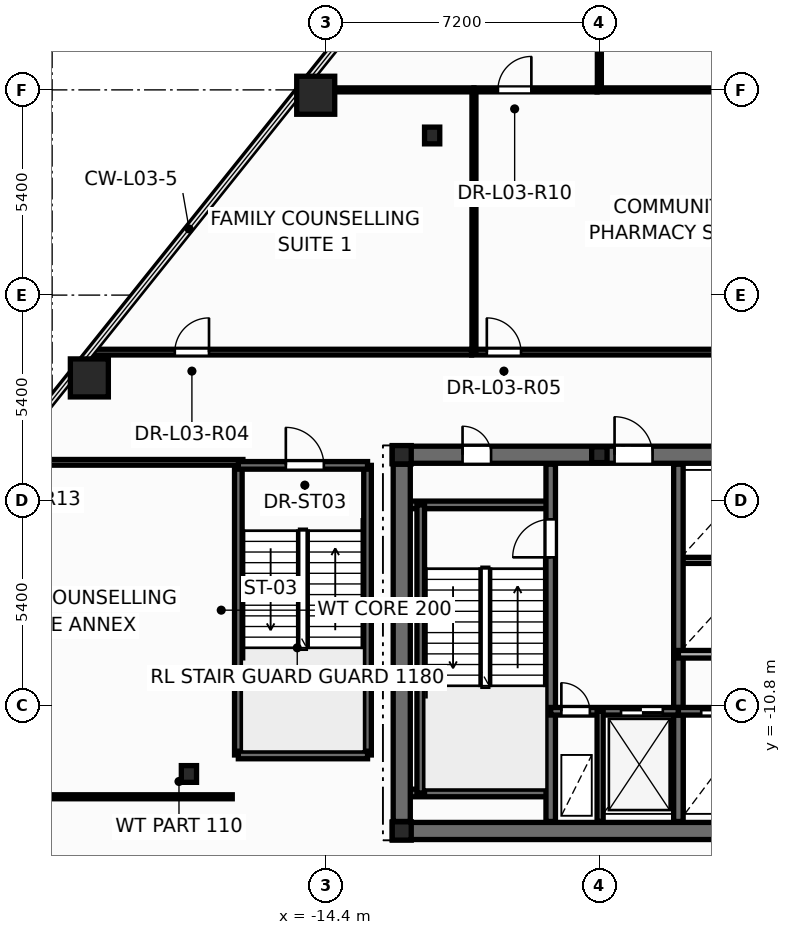
"""IFC4 building model, lengths in metres.
Left out: names, types, materials, properties, quantities, classifications, styles, units other than length and angle.
Written with IfcOpenShell. Run it as: python <this file> out.ifc"""

import sys

from ifc_helpers import new_model, si_unit, direction, frame, frame_2d, origin, origin_2d, place, context, subcontext, project, spatial, rectangle, hollow_circle, i_section, extrude, element, fill, save


model = new_model("IFC4")
c1 = context("Model", 3, precision=1e-05, world=origin(), true_north=direction((0.0, 1.0)))
c2 = subcontext(c1, "Body", "Model", "MODEL_VIEW")
j1 = project(units=[si_unit("LENGTHUNIT", "METRE"), si_unit("PLANEANGLEUNIT", "RADIAN")], contexts=[c1])
p1 = place(None, origin())
s1 = spatial("IfcSite", under=j1, at=p1, CompositionType="ELEMENT")
p2 = place(p1, origin())
s2 = spatial("IfcBuilding", under=s1, at=p2, CompositionType="ELEMENT")
p3 = place(p2, frame((0.0, 0.0, 14.4)))
s3 = spatial("IfcBuildingStorey", under=s2, at=p3, CompositionType="ELEMENT", Elevation=14.4)
for number, where, z_axis, x_axis in (
    (1, (-14.664, 5.259, 0.0), (0.0, 0.0, 1.0), (1.0, 0.0, 0.0)),
    (2, (-20.62, -2.179, 0.0), (0.0, 0.0, 1.0), (1.0, 0.0, 0.0)),
):
    element("IfcColumn", number, at=place(p3, frame(where, z_axis=z_axis, x_axis=x_axis)), inside=s3, PredefinedType="COLUMN", context=c2, shape_type="SweptSolid", body=[
        extrude(hollow_circle(Radius=0.5, WallThickness=0.045, at=origin_2d()), origin(), (0.0, 0.0, 1.0), 4.5),
    ])
for number, where, z_axis, x_axis in (
    (3, (-12.4, -14.1, 0.0), (0.0, 0.0, 1.0), (1.0, 0.0, 0.0)),
    (4, (-12.4, -4.2, 0.0), (0.0, 0.0, 1.0), (1.0, 0.0, 0.0)),
):
    element("IfcColumn", number, at=place(p3, frame(where, z_axis=z_axis, x_axis=x_axis)), inside=s3, PredefinedType="COLUMN", context=c2, shape_type="SweptSolid", body=[
        extrude(i_section(OverallWidth=0.5, OverallDepth=0.482, WebThickness=0.04, FlangeThickness=0.045, at=origin_2d()), origin(), (0.0, 0.0, 1.0), 4.5),
    ])
p4 = place(p3, frame((-7.2, -4.2, 0.0), z_axis=(0.0, 0.0, 1.0), x_axis=(1.0, 0.0, 0.0)))
e5 = element("IfcColumn", 5, at=p4, inside=s3, PredefinedType="PILASTER", context=c2, shape_type="SweptSolid", body=[
    extrude(i_section(OverallWidth=0.405, OverallDepth=0.414, WebThickness=0.022, FlangeThickness=0.032, at=origin_2d()), origin(), (0.0, 0.0, 1.0), 4.5),
])
for number, where, z_axis, x_axis in (
    (6, (-18.0, -12.6, 0.0), (0.0, 0.0, 1.0), (1.0, 0.0, 0.0)),
    (7, (-11.6, 4.2, 0.0), (0.0, 0.0, 1.0), (1.0, 0.0, 0.0)),
):
    element("IfcColumn", number, at=place(p3, frame(where, z_axis=z_axis, x_axis=x_axis)), inside=s3, PredefinedType="COLUMN", context=c2, shape_type="SweptSolid", body=[
        extrude(i_section(OverallWidth=0.4, OverallDepth=0.44, WebThickness=0.028, FlangeThickness=0.04, at=origin_2d()), origin(), (0.0, 0.0, 1.0), 4.5),
    ])
p5 = place(p3, frame((-5.12, -6.98, 0.0), z_axis=(0.0, 0.0, 1.0), x_axis=(1.0, 0.0, 0.0)))
e8 = element("IfcWall", 8, at=p5, inside=s3, PredefinedType="PARTITIONING", context=c2, shape_type="SweptSolid", body=[
    extrude(rectangle(XDim=2.24, YDim=0.16, at=frame_2d((1.12, 0.0))), origin(), (0.0, 0.0, 1.0), 4.1),
])
p6 = place(p3, frame((-12.65, -14.1, 0.0), z_axis=(0.0, 0.0, 1.0), x_axis=(1.0, 0.0, 0.0)))
e9 = element("IfcWall", 9, at=p6, inside=s3, PredefinedType="SHEAR", context=c2, shape_type="SweptSolid", body=[
    extrude(rectangle(XDim=25.3, YDim=0.45, at=frame_2d((12.65, 0.0))), origin(), (0.0, 0.0, 1.0), 4.5),
])
p7 = place(p3, frame((-12.65, -4.2, 0.0), z_axis=(0.0, 0.0, 1.0), x_axis=(1.0, 0.0, 0.0)))
e10 = element("IfcWall", 10, at=p7, inside=s3, PredefinedType="SHEAR", context=c2, shape_type="SweptSolid", body=[
    extrude(rectangle(XDim=25.3, YDim=0.45, at=frame_2d((12.65, 0.0))), origin(), (0.0, 0.0, 1.0), 4.5),
])
p8 = place(p7, frame((1.85, 0.0, 0.0)))
e11 = element("IfcOpeningElement", 11, at=p8, cuts=e10, PredefinedType="OPENING", context=c2, shape_type="SweptSolid", body=[
    extrude(rectangle(XDim=0.756, YDim=2.054, at=frame_2d((0.375, 1.027))), frame((0.0, 0.235, 0.0), z_axis=(0.0, -1.0, 0.0), x_axis=(1.0, 0.0, 0.0)), (0.0, 0.0, 1.0), 0.47),
])
p9 = place(p7, frame((22.65, 0.0, 0.0)))
e12 = element("IfcOpeningElement", 12, at=p9, cuts=e10, PredefinedType="OPENING", context=c2, shape_type="SweptSolid", body=[
    extrude(rectangle(XDim=0.756, YDim=2.054, at=frame_2d((0.375, 1.027))), frame((0.0, 0.235, 0.0), z_axis=(0.0, -1.0, 0.0), x_axis=(1.0, 0.0, 0.0)), (0.0, 0.0, 1.0), 0.47),
])
p10 = place(p7, frame((5.85, 0.0, 0.0)))
e13 = element("IfcOpeningElement", 13, at=p10, cuts=e10, PredefinedType="OPENING", context=c2, shape_type="SweptSolid", body=[
    extrude(rectangle(XDim=1.006, YDim=2.104, at=frame_2d((0.5, 1.052))), frame((0.0, 0.235, 0.0), z_axis=(0.0, -1.0, 0.0), x_axis=(1.0, 0.0, 0.0)), (0.0, 0.0, 1.0), 0.47),
])
p11 = place(p7, frame((10.35, 0.0, 0.0)))
e14 = element("IfcOpeningElement", 14, at=p11, cuts=e10, PredefinedType="OPENING", context=c2, shape_type="SweptSolid", body=[
    extrude(rectangle(XDim=1.406, YDim=2.154, at=frame_2d((0.7, 1.077))), frame((0.0, 0.235, 0.0), z_axis=(0.0, -1.0, 0.0), x_axis=(1.0, 0.0, 0.0)), (0.0, 0.0, 1.0), 0.47),
])
p12 = place(p7, frame((18.45, 0.0, 0.0)))
e15 = element("IfcOpeningElement", 15, at=p12, cuts=e10, PredefinedType="OPENING", context=c2, shape_type="SweptSolid", body=[
    extrude(rectangle(XDim=1.006, YDim=2.104, at=frame_2d((0.5, 1.052))), frame((0.0, 0.235, 0.0), z_axis=(0.0, -1.0, 0.0), x_axis=(1.0, 0.0, 0.0)), (0.0, 0.0, 1.0), 0.47),
])
for number, where, z_axis, x_axis in (
    (16, (-12.35, -5.52, 0.0), (0.0, 0.0, 1.0), (1.0, 0.0, 0.0)),
    (17, (-12.35, -13.1, 0.0), (0.0, 0.0, 1.0), (1.0, 0.0, 0.0)),
):
    element("IfcWall", number, at=place(p3, frame(where, z_axis=z_axis, x_axis=x_axis)), inside=s3, PredefinedType="SOLIDWALL", context=c2, shape_type="SweptSolid", body=[
        extrude(rectangle(XDim=3.87, YDim=0.2, at=frame_2d((1.935, 0.0))), origin(), (0.0, 0.0, 1.0), 4.5),
    ])
p13 = place(p3, frame((-11.9, -13.1, 0.0), z_axis=(0.0, 0.0, 1.0), x_axis=(0.0, 1.0, 0.0)))
e18 = element("IfcWall", 18, at=p13, inside=s3, PredefinedType="SOLIDWALL", context=c2, shape_type="SweptSolid", body=[
    extrude(rectangle(XDim=7.58, YDim=0.2, at=frame_2d((3.79, 0.0))), origin(), (0.0, 0.0, 1.0), 4.5),
])
p14 = place(p3, frame((-8.48, -13.85, 0.0), z_axis=(0.0, 0.0, 1.0), x_axis=(0.0, 1.0, 0.0)))
e19 = element("IfcWall", 19, at=p14, inside=s3, PredefinedType="SHEAR", context=c2, shape_type="SweptSolid", body=[
    extrude(rectangle(XDim=9.4, YDim=0.25, at=frame_2d((4.7, 0.0))), origin(), (0.0, 0.0, 1.0), 4.5),
])
p15 = place(p14, frame((6.95, 0.0, 0.0)))
e20 = element("IfcOpeningElement", 20, at=p15, cuts=e19, PredefinedType="OPENING", context=c2, shape_type="SweptSolid", body=[
    extrude(rectangle(XDim=1.006, YDim=2.104, at=frame_2d((0.5, 1.052))), frame((0.0, 0.135, 0.0), z_axis=(0.0, -1.0, 0.0), x_axis=(1.0, 0.0, 0.0)), (0.0, 0.0, 1.0), 0.27),
])
p16 = place(p3, frame((-5.12, -13.85, 0.0), z_axis=(0.0, 0.0, 1.0), x_axis=(0.0, 1.0, 0.0)))
e21 = element("IfcWall", 21, at=p16, inside=s3, PredefinedType="SHEAR", context=c2, shape_type="SweptSolid", body=[
    extrude(rectangle(XDim=9.4, YDim=0.25, at=frame_2d((4.7, 0.0))), origin(), (0.0, 0.0, 1.0), 4.5),
])
p17 = place(p3, frame((-8.48, -10.95, 0.0), z_axis=(0.0, 0.0, 1.0), x_axis=(1.0, 0.0, 0.0)))
e22 = element("IfcWall", 22, at=p17, inside=s3, PredefinedType="SOLIDWALL", context=c2, shape_type="SweptSolid", body=[
    extrude(rectangle(XDim=3.36, YDim=0.2, at=frame_2d((1.68, 0.0))), origin(), (0.0, 0.0, 1.0), 4.5),
])
p18 = place(p17, frame((0.28, 0.0, 0.0)))
e23 = element("IfcOpeningElement", 23, at=p18, cuts=e22, PredefinedType="OPENING", context=c2, shape_type="SweptSolid", body=[
    extrude(rectangle(XDim=0.756, YDim=2.054, at=frame_2d((0.375, 1.027))), frame((0.0, 0.11, 0.0), z_axis=(0.0, -1.0, 0.0), x_axis=(1.0, 0.0, 0.0)), (0.0, 0.0, 1.0), 0.22),
])
p19 = place(p17, frame((1.85, 0.0, 0.0)))
e24 = element("IfcOpeningElement", 24, at=p19, cuts=e22, PredefinedType="OPENING", context=c2, shape_type="SweptSolid", body=[
    extrude(rectangle(XDim=1.106, YDim=2.104, at=frame_2d((0.55, 1.052))), frame((0.0, 0.11, 0.0), z_axis=(0.0, -1.0, 0.0), x_axis=(1.0, 0.0, 0.0)), (0.0, 0.0, 1.0), 0.22),
])
p20 = place(p3, frame((-5.12, -10.95, 0.0), z_axis=(0.0, 0.0, 1.0), x_axis=(1.0, 0.0, 0.0)))
e25 = element("IfcWall", 25, at=p20, inside=s3, PredefinedType="SOLIDWALL", context=c2, shape_type="SweptSolid", body=[
    extrude(rectangle(XDim=10.24, YDim=0.2, at=frame_2d((5.12, 0.0))), origin(), (0.0, 0.0, 1.0), 4.5),
])
p21 = place(p20, frame((0.6, 0.0, 0.0)))
e26 = element("IfcOpeningElement", 26, at=p21, cuts=e25, PredefinedType="OPENING", context=c2, shape_type="SweptSolid", body=[
    extrude(rectangle(XDim=1.106, YDim=2.104, at=frame_2d((0.55, 1.052))), frame((0.0, 0.11, 0.0), z_axis=(0.0, -1.0, 0.0), x_axis=(1.0, 0.0, 0.0)), (0.0, 0.0, 1.0), 0.22),
])
p22 = place(p20, frame((2.67, 0.0, 0.0)))
e27 = element("IfcOpeningElement", 27, at=p22, cuts=e25, PredefinedType="OPENING", context=c2, shape_type="SweptSolid", body=[
    extrude(rectangle(XDim=1.106, YDim=2.104, at=frame_2d((0.55, 1.052))), frame((0.0, 0.11, 0.0), z_axis=(0.0, -1.0, 0.0), x_axis=(1.0, 0.0, 0.0)), (0.0, 0.0, 1.0), 0.22),
])
p23 = place(p20, frame((4.57, 0.0, 0.0)))
e28 = element("IfcOpeningElement", 28, at=p23, cuts=e25, PredefinedType="OPENING", context=c2, shape_type="SweptSolid", body=[
    extrude(rectangle(XDim=1.106, YDim=2.104, at=frame_2d((0.55, 1.052))), frame((0.0, 0.11, 0.0), z_axis=(0.0, -1.0, 0.0), x_axis=(1.0, 0.0, 0.0)), (0.0, 0.0, 1.0), 0.22),
])
p24 = place(p20, frame((6.47, 0.0, 0.0)))
e29 = element("IfcOpeningElement", 29, at=p24, cuts=e25, PredefinedType="OPENING", context=c2, shape_type="SweptSolid", body=[
    extrude(rectangle(XDim=1.106, YDim=2.104, at=frame_2d((0.55, 1.052))), frame((0.0, 0.11, 0.0), z_axis=(0.0, -1.0, 0.0), x_axis=(1.0, 0.0, 0.0)), (0.0, 0.0, 1.0), 0.22),
])
p25 = place(p20, frame((8.54, 0.0, 0.0)))
e30 = element("IfcOpeningElement", 30, at=p25, cuts=e25, PredefinedType="OPENING", context=c2, shape_type="SweptSolid", body=[
    extrude(rectangle(XDim=1.106, YDim=2.104, at=frame_2d((0.55, 1.052))), frame((0.0, 0.11, 0.0), z_axis=(0.0, -1.0, 0.0), x_axis=(1.0, 0.0, 0.0)), (0.0, 0.0, 1.0), 0.22),
])
p26 = place(p3, frame((-7.18, -13.85, 0.0), z_axis=(0.0, 0.0, 1.0), x_axis=(0.0, 1.0, 0.0)))
e31 = element("IfcWall", 31, at=p26, inside=s3, PredefinedType="PARTITIONING", context=c2, shape_type="SweptSolid", body=[
    extrude(rectangle(XDim=2.9, YDim=0.16, at=frame_2d((1.45, 0.0))), origin(), (0.0, 0.0, 1.0), 3.125),
])
p27 = place(p3, frame((-12.4, -13.85, 0.0), z_axis=(0.0, 0.0, 1.0), x_axis=(0.0, 1.0, 0.0)))
e32 = element("IfcWall", 32, at=p27, inside=s3, PredefinedType="SHEAR", context=c2, shape_type="SweptSolid", body=[
    extrude(rectangle(XDim=9.4, YDim=0.45, at=frame_2d((4.7, 0.0))), origin(), (0.0, 0.0, 1.0), 4.5),
])
p28 = place(p3, frame((-5.12, -9.45, 0.0), z_axis=(0.0, 0.0, 1.0), x_axis=(1.0, 0.0, 0.0)))
e33 = element("IfcWall", 33, at=p28, inside=s3, PredefinedType="SOLIDWALL", context=c2, shape_type="SweptSolid", body=[
    extrude(rectangle(XDim=2.24, YDim=0.2, at=frame_2d((1.12, 0.0))), origin(), (0.0, 0.0, 1.0), 4.1),
])
p29 = place(p3, frame((-10.56, -1.5, 0.0), z_axis=(0.0, 0.0, 1.0), x_axis=(1.0, 0.0, 0.0)))
e34 = element("IfcWall", 34, at=p29, inside=s3, PredefinedType="PARTITIONING", context=c2, shape_type="SweptSolid", body=[
    extrude(rectangle(XDim=10.62, YDim=0.15, at=frame_2d((5.31, 0.0))), origin(), (0.0, 0.0, 1.0), 4.1),
])
p30 = place(p29, frame((0.399, 0.0, 0.0)))
e35 = element("IfcOpeningElement", 35, at=p30, cuts=e34, PredefinedType="OPENING", context=c2, shape_type="SweptSolid", body=[
    extrude(rectangle(XDim=0.906, YDim=2.104, at=frame_2d((0.45, 1.052))), frame((0.0, 0.085, 0.0), z_axis=(0.0, -1.0, 0.0), x_axis=(1.0, 0.0, 0.0)), (0.0, 0.0, 1.0), 0.17),
])
p31 = place(p3, frame((-20.589, -1.5, 0.0), z_axis=(0.0, 0.0, 1.0), x_axis=(1.0, 0.0, 0.0)))
e36 = element("IfcWall", 36, at=p31, inside=s3, PredefinedType="PARTITIONING", context=c2, shape_type="SweptSolid", body=[
    extrude(rectangle(XDim=10.027, YDim=0.15, at=frame_2d((5.014, 0.0))), origin(), (0.0, 0.0, 1.0), 3.167),
])
p32 = place(p31, frame((2.218, 0.0, 0.0)))
e37 = element("IfcOpeningElement", 37, at=p32, cuts=e36, PredefinedType="OPENING", context=c2, shape_type="SweptSolid", body=[
    extrude(rectangle(XDim=0.906, YDim=2.104, at=frame_2d((0.45, 1.052))), frame((0.0, 0.085, 0.0), z_axis=(0.0, -1.0, 0.0), x_axis=(1.0, 0.0, 0.0)), (0.0, 0.0, 1.0), 0.17),
])
p33 = place(p3, frame((-26.205, -13.2, 0.0), z_axis=(0.0, 0.0, 1.0), x_axis=(1.0, 0.0, 0.0)))
e38 = element("IfcWall", 38, at=p33, inside=s3, PredefinedType="PARTITIONING", context=c2, shape_type="SweptSolid", body=[
    extrude(rectangle(XDim=9.345, YDim=0.105, at=frame_2d((4.672, 0.0))), origin(), (0.0, 0.0, 1.0), 3.463),
])
p34 = place(p33, frame((0.1, 0.0, 0.0)))
e39 = element("IfcOpeningElement", 39, at=p34, cuts=e38, PredefinedType="OPENING", context=c2, shape_type="SweptSolid", body=[
    extrude(rectangle(XDim=0.886, YDim=2.104, at=frame_2d((0.44, 1.052))), frame((0.0, 0.062, 0.0), z_axis=(0.0, -1.0, 0.0), x_axis=(1.0, 0.0, 0.0)), (0.0, 0.0, 1.0), 0.125),
])
p35 = place(p3, frame((-7.2, 5.4, 0.0), z_axis=(0.0, 0.0, 1.0), x_axis=(0.0, 1.0, 0.0)))
e40 = element("IfcWall", 40, at=p35, inside=s3, PredefinedType="PARTITIONING", context=c2, shape_type="SweptSolid", body=[
    extrude(rectangle(XDim=8.936, YDim=0.105, at=frame_2d((4.468, 0.0))), origin(), (0.0, 0.0, 1.0), 3.075),
])
for number, where, z_axis, x_axis in (
    (41, (-16.7, -12.1, 0.0), (0.0, 0.0, 1.0), (0.0, 1.0, 0.0)),
    (42, (-13.3, -12.1, 0.0), (0.0, 0.0, 1.0), (0.0, 1.0, 0.0)),
):
    element("IfcWall", number, at=place(p3, frame(where, z_axis=z_axis, x_axis=x_axis)), inside=s3, PredefinedType="SOLIDWALL", context=c2, shape_type="SweptSolid", body=[
        extrude(rectangle(XDim=7.62, YDim=0.2, at=frame_2d((3.81, 0.0))), origin(), (0.0, 0.0, 1.0), 4.5),
    ])
p36 = place(p3, frame((-7.26, 5.4, 0.0), z_axis=(0.0, 0.0, 1.0), x_axis=(1.0, 0.0, 0.0)))
e43 = element("IfcWall", 43, at=p36, inside=s3, PredefinedType="PARTITIONING", context=c2, shape_type="SweptSolid", body=[
    extrude(rectangle(XDim=7.26, YDim=0.105, at=frame_2d((3.63, 0.0))), origin(), (0.0, 0.0, 1.0), 4.1),
])
p37 = place(p3, frame((-10.5, -1.5, 0.0), z_axis=(0.0, 0.0, 1.0), x_axis=(0.0, 1.0, 0.0)))
e44 = element("IfcWall", 44, at=p37, inside=s3, PredefinedType="PARTITIONING", context=c2, shape_type="SweptSolid", body=[
    extrude(rectangle(XDim=6.9, YDim=0.105, at=frame_2d((3.45, 0.0))), origin(), (0.0, 0.0, 1.0), 2.875),
])
p38 = place(p3, frame((-22.912, -4.4, 0.0), z_axis=(0.0, 0.0, 1.0), x_axis=(1.0, 0.0, 0.0)))
e45 = element("IfcWall", 45, at=p38, inside=s3, PredefinedType="PARTITIONING", context=c2, shape_type="SweptSolid", body=[
    extrude(rectangle(XDim=6.332, YDim=0.15, at=frame_2d((3.166, 0.0))), origin(), (0.0, 0.0, 1.0), 3.463),
])
p39 = place(p38, frame((0.1, 0.0, 0.0)))
e46 = element("IfcOpeningElement", 46, at=p39, cuts=e45, PredefinedType="OPENING", context=c2, shape_type="SweptSolid", body=[
    extrude(rectangle(XDim=0.906, YDim=2.104, at=frame_2d((0.45, 1.052))), frame((0.0, 0.085, 0.0), z_axis=(0.0, -1.0, 0.0), x_axis=(1.0, 0.0, 0.0)), (0.0, 0.0, 1.0), 0.17),
])
p40 = place(p3, frame((-15.063, 5.4, 0.0), z_axis=(0.0, 0.0, 1.0), x_axis=(1.0, 0.0, 0.0)))
e47 = element("IfcWall", 47, at=p40, inside=s3, PredefinedType="PARTITIONING", context=c2, shape_type="SweptSolid", body=[
    extrude(rectangle(XDim=4.563, YDim=0.105, at=frame_2d((2.281, 0.0))), origin(), (0.0, 0.0, 1.0), 3.075),
])
p41 = place(p3, frame((-16.7, -12.1, 0.0), z_axis=(0.0, 0.0, 1.0), x_axis=(1.0, 0.0, 0.0)))
e48 = element("IfcWall", 48, at=p41, inside=s3, PredefinedType="SOLIDWALL", context=c2, shape_type="SweptSolid", body=[
    extrude(rectangle(XDim=3.4, YDim=0.2, at=frame_2d((1.7, 0.0))), origin(), (0.0, 0.0, 1.0), 4.5),
])
p42 = place(p3, frame((-16.7, -4.48, 0.0), z_axis=(0.0, 0.0, 1.0), x_axis=(1.0, 0.0, 0.0)))
e49 = element("IfcWall", 49, at=p42, inside=s3, PredefinedType="SOLIDWALL", context=c2, shape_type="SweptSolid", body=[
    extrude(rectangle(XDim=3.4, YDim=0.2, at=frame_2d((1.7, 0.0))), origin(), (0.0, 0.0, 1.0), 4.5),
])
p43 = place(p42, frame((1.25, 0.0, 0.0)))
e50 = element("IfcOpeningElement", 50, at=p43, cuts=e49, PredefinedType="OPENING", context=c2, shape_type="SweptSolid", body=[
    extrude(rectangle(XDim=1.006, YDim=2.104, at=frame_2d((0.5, 1.052))), frame((0.0, 0.11, 0.0), z_axis=(0.0, -1.0, 0.0), x_axis=(1.0, 0.0, 0.0)), (0.0, 0.0, 1.0), 0.22),
])
p44 = place(p3, frame((-10.5, 5.4, 0.0), z_axis=(0.0, 0.0, 1.0), x_axis=(1.0, 0.0, 0.0)))
e51 = element("IfcWall", 51, at=p44, inside=s3, PredefinedType="PARTITIONING", context=c2, shape_type="SweptSolid", body=[
    extrude(rectangle(XDim=3.238, YDim=0.105, at=frame_2d((1.619, 0.0))), origin(), (0.0, 0.0, 1.0), 3.075),
])
p45 = place(p44, frame((0.631, 0.0, 0.0)))
e52 = element("IfcOpeningElement", 52, at=p45, cuts=e51, PredefinedType="OPENING", context=c2, shape_type="SweptSolid", body=[
    extrude(rectangle(XDim=0.886, YDim=2.104, at=frame_2d((0.44, 1.052))), frame((0.0, 0.062, 0.0), z_axis=(0.0, -1.0, 0.0), x_axis=(1.0, 0.0, 0.0)), (0.0, 0.0, 1.0), 0.125),
])
p46 = place(p15, origin())
e53 = element("IfcDoor", 53, at=p46, inside=s3, OperationType="SINGLE_SWING_LEFT", PredefinedType="DOOR", context=c2, shape_type="SweptSolid", body=[
    extrude(rectangle(XDim=1.0, YDim=2.1, at=frame_2d((0.5, 1.05))), frame((0.0, 0.025, 0.0), z_axis=(0.0, -1.0, 0.0), x_axis=(1.0, 0.0, 0.0)), (0.0, 0.0, 1.0), 0.05),
])
fill(e20, e53)
p47 = place(p18, origin())
e54 = element("IfcDoor", 54, at=p47, inside=s3, OperationType="SINGLE_SWING_LEFT", PredefinedType="DOOR", context=c2, shape_type="SweptSolid", body=[
    extrude(rectangle(XDim=0.75, YDim=2.05, at=frame_2d((0.375, 1.025))), frame((0.0, 0.025, 0.0), z_axis=(0.0, -1.0, 0.0), x_axis=(1.0, 0.0, 0.0)), (0.0, 0.0, 1.0), 0.05),
])
fill(e23, e54)
p48 = place(p19, origin())
e55 = element("IfcDoor", 55, at=p48, inside=s3, OperationType="DOUBLE_DOOR_SLIDING", PredefinedType="DOOR", context=c2, shape_type="SweptSolid", body=[
    extrude(rectangle(XDim=1.1, YDim=2.1, at=frame_2d((0.55, 1.05))), frame((0.0, 0.025, 0.0), z_axis=(0.0, -1.0, 0.0), x_axis=(1.0, 0.0, 0.0)), (0.0, 0.0, 1.0), 0.05),
])
fill(e24, e55)
p49 = place(p21, origin())
e56 = element("IfcDoor", 56, at=p49, inside=s3, OperationType="DOUBLE_DOOR_SLIDING", PredefinedType="DOOR", context=c2, shape_type="SweptSolid", body=[
    extrude(rectangle(XDim=1.1, YDim=2.1, at=frame_2d((0.55, 1.05))), frame((0.0, 0.025, 0.0), z_axis=(0.0, -1.0, 0.0), x_axis=(1.0, 0.0, 0.0)), (0.0, 0.0, 1.0), 0.05),
])
fill(e26, e56)
p50 = place(p8, origin())
e57 = element("IfcDoor", 57, at=p50, inside=s3, OperationType="SINGLE_SWING_LEFT", PredefinedType="DOOR", context=c2, shape_type="SweptSolid", body=[
    extrude(rectangle(XDim=0.75, YDim=2.05, at=frame_2d((0.375, 1.025))), frame((0.0, 0.025, 0.0), z_axis=(0.0, -1.0, 0.0), x_axis=(1.0, 0.0, 0.0)), (0.0, 0.0, 1.0), 0.05),
])
fill(e11, e57)
p51 = place(p10, origin())
e58 = element("IfcDoor", 58, at=p51, inside=s3, OperationType="SINGLE_SWING_LEFT", PredefinedType="DOOR", context=c2, shape_type="SweptSolid", body=[
    extrude(rectangle(XDim=1.0, YDim=2.1, at=frame_2d((0.5, 1.05))), frame((0.0, 0.025, 0.0), z_axis=(0.0, -1.0, 0.0), x_axis=(1.0, 0.0, 0.0)), (0.0, 0.0, 1.0), 0.05),
])
fill(e13, e58)
p52 = place(p43, origin())
e59 = element("IfcDoor", 59, at=p52, inside=s3, OperationType="SINGLE_SWING_LEFT", PredefinedType="DOOR", context=c2, shape_type="SweptSolid", body=[
    extrude(rectangle(XDim=1.0, YDim=2.1, at=frame_2d((0.5, 1.05))), frame((0.0, 0.025, 0.0), z_axis=(0.0, -1.0, 0.0), x_axis=(1.0, 0.0, 0.0)), (0.0, 0.0, 1.0), 0.05),
])
fill(e50, e59)
p53 = place(p32, origin())
e60 = element("IfcDoor", 60, at=p53, inside=s3, OperationType="SINGLE_SWING_RIGHT", PredefinedType="DOOR", context=c2, shape_type="SweptSolid", body=[
    extrude(rectangle(XDim=0.9, YDim=2.1, at=frame_2d((0.45, 1.05))), frame((0.0, 0.025, 0.0), z_axis=(0.0, -1.0, 0.0), x_axis=(1.0, 0.0, 0.0)), (0.0, 0.0, 1.0), 0.05),
])
fill(e37, e60)
p54 = place(p30, origin())
e61 = element("IfcDoor", 61, at=p54, inside=s3, OperationType="SINGLE_SWING_LEFT", PredefinedType="DOOR", context=c2, shape_type="SweptSolid", body=[
    extrude(rectangle(XDim=0.9, YDim=2.1, at=frame_2d((0.45, 1.05))), frame((0.0, 0.025, 0.0), z_axis=(0.0, -1.0, 0.0), x_axis=(1.0, 0.0, 0.0)), (0.0, 0.0, 1.0), 0.05),
])
fill(e35, e61)
p55 = place(p45, origin())
e62 = element("IfcDoor", 62, at=p55, inside=s3, OperationType="SINGLE_SWING_RIGHT", PredefinedType="DOOR", context=c2, shape_type="SweptSolid", body=[
    extrude(rectangle(XDim=0.88, YDim=2.1, at=frame_2d((0.44, 1.05))), frame((0.0, 0.025, 0.0), z_axis=(0.0, -1.0, 0.0), x_axis=(1.0, 0.0, 0.0)), (0.0, 0.0, 1.0), 0.05),
])
fill(e52, e62)
save(model, sys.argv[1])
